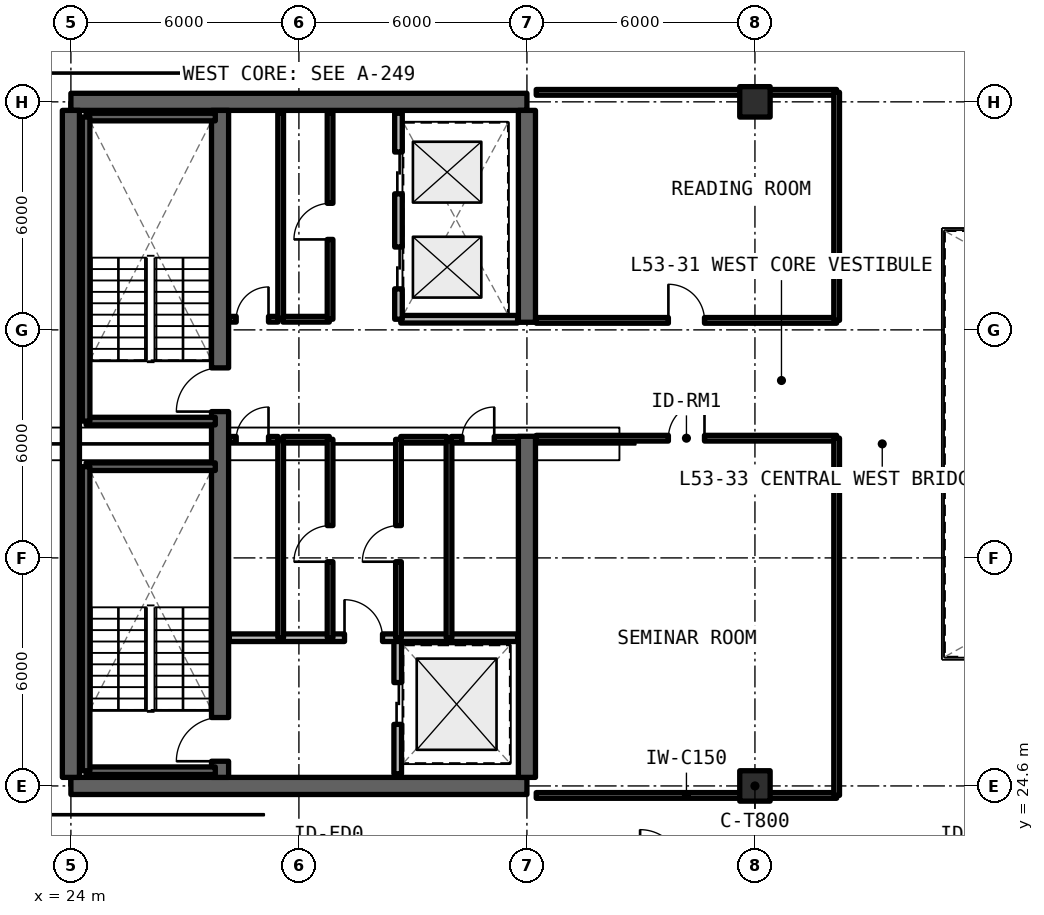
"""IFC4 building model, lengths in metres.
Left out: names, types, materials, properties, quantities, classifications, styles, units other than length and angle.
Written with IfcOpenShell. Run it as: python <this file> out.ifc"""

import sys

from ifc_helpers import new_model, si_unit, direction, frame, frame_2d, origin, origin_2d, place, context, subcontext, project, spatial, rectangle, extrude, element, fill, save


model = new_model("IFC4")
c1 = context("Model", 3, precision=1e-05, world=origin(), true_north=direction((0.0, 1.0)))
c2 = subcontext(c1, "Body", "Model", "MODEL_VIEW")
j1 = project(units=[si_unit("LENGTHUNIT", "METRE"), si_unit("PLANEANGLEUNIT", "RADIAN")], contexts=[c1])
p1 = place(None, origin())
s1 = spatial("IfcSite", under=j1, at=p1, CompositionType="ELEMENT")
p2 = place(p1, origin())
s2 = spatial("IfcBuilding", under=s1, at=p2, CompositionType="ELEMENT")
p3 = place(p2, frame((0.0, 0.0, 191.73)))
s3 = spatial("IfcBuildingStorey", under=s2, at=p3, CompositionType="ELEMENT", Elevation=191.73)
for number, where, z_axis, x_axis in (
    (1, (24.0, 24.6, 0.0), (0.0, 0.0, 1.0), (1.0, 0.0, 0.0)),
    (2, (36.0, 42.6, 0.0), (0.0, 0.0, 1.0), (-1.0, 0.0, 0.0)),
):
    element("IfcWall", number, at=place(p3, frame(where, z_axis=z_axis, x_axis=x_axis)), inside=s3, PredefinedType="SHEAR", context=c2, shape_type="SweptSolid", body=[
        extrude(rectangle(XDim=12.0, YDim=0.45, at=frame_2d((6.0, 0.0))), origin(), (0.0, 0.0, 1.0), 3.3),
    ])
p4 = place(p3, frame((24.0, 24.825, 0.0), z_axis=(0.0, 0.0, 1.0), x_axis=(0.0, 1.0, 0.0)))
e3 = element("IfcWall", 3, at=p4, inside=s3, PredefinedType="SHEAR", context=c2, shape_type="SweptSolid", body=[
    extrude(rectangle(XDim=17.55, YDim=0.45, at=frame_2d((8.775, 0.0))), origin(), (0.0, 0.0, 1.0), 3.3),
])
p5 = place(p3, frame((36.0, 24.825, 0.0), z_axis=(0.0, 0.0, 1.0), x_axis=(0.0, 1.0, 0.0)))
e4 = element("IfcWall", 4, at=p5, inside=s3, PredefinedType="SHEAR", context=c2, shape_type="SweptSolid", body=[
    extrude(rectangle(XDim=8.975, YDim=0.45, at=frame_2d((4.488, 0.0))), origin(), (0.0, 0.0, 1.0), 3.3),
])
p6 = place(p3, frame((36.0, 36.8, 0.0), z_axis=(0.0, 0.0, 1.0), x_axis=(0.0, 1.0, 0.0)))
e5 = element("IfcWall", 5, at=p6, inside=s3, PredefinedType="SHEAR", context=c2, shape_type="SweptSolid", body=[
    extrude(rectangle(XDim=5.575, YDim=0.45, at=frame_2d((2.788, 0.0))), origin(), (0.0, 0.0, 1.0), 3.3),
])
p7 = place(p3, frame((27.925, 24.825, 0.0), z_axis=(0.0, 0.0, 1.0), x_axis=(0.0, 1.0, 0.0)))
e6 = element("IfcWall", 6, at=p7, inside=s3, PredefinedType="SHEAR", context=c2, shape_type="SweptSolid", body=[
    extrude(rectangle(XDim=17.55, YDim=0.45, at=frame_2d((8.775, 0.0))), origin(), (0.0, 0.0, 1.0), 3.3),
])
p8 = place(p7, frame((0.425, 0.0, 0.0)))
e7 = element("IfcOpeningElement", 7, at=p8, cuts=e6, PredefinedType="OPENING", context=c2, shape_type="SweptSolid", body=[
    extrude(rectangle(XDim=1.15, YDim=2.15, at=frame_2d((0.575, 1.075))), frame((0.0, 0.235, 0.0), z_axis=(0.0, -1.0, 0.0), x_axis=(1.0, 0.0, 0.0)), (0.0, 0.0, 1.0), 0.47),
])
p9 = place(p7, frame((9.625, 0.0, 0.0)))
e8 = element("IfcOpeningElement", 8, at=p9, cuts=e6, PredefinedType="OPENING", context=c2, shape_type="SweptSolid", body=[
    extrude(rectangle(XDim=1.15, YDim=2.15, at=frame_2d((0.575, 1.075))), frame((0.0, 0.235, 0.0), z_axis=(0.0, -1.0, 0.0), x_axis=(1.0, 0.0, 0.0)), (0.0, 0.0, 1.0), 0.47),
])
for number, where, z_axis, x_axis in (
    (9, (42.0, 24.6, 0.0), (0.0, 0.0, 1.0), (1.0, 0.0, 0.0)),
    (10, (42.0, 42.6, 0.0), (0.0, 0.0, 1.0), (1.0, 0.0, 0.0)),
):
    element("IfcColumn", number, at=place(p3, frame(where, z_axis=z_axis, x_axis=x_axis)), inside=s3, PredefinedType="COLUMN", context=c2, shape_type="SweptSolid", body=[
        extrude(rectangle(XDim=0.8, YDim=0.8, at=origin_2d()), origin(), (0.0, 0.0, 1.0), 3.3),
    ])
p10 = place(p3, frame((32.6, 24.92, 0.0), z_axis=(0.0, 0.0, 1.0), x_axis=(0.0, 1.0, 0.0)))
e11 = element("IfcWall", 11, at=p10, inside=s3, PredefinedType="SOLIDWALL", context=c2, shape_type="SweptSolid", body=[
    extrude(rectangle(XDim=3.58, YDim=0.2, at=frame_2d((1.79, 0.0))), origin(), (0.0, 0.0, 1.0), 2.35),
])
p11 = place(p10, frame((1.3, 0.0, 0.0)))
e12 = element("IfcOpeningElement", 12, at=p11, cuts=e11, PredefinedType="OPENING", context=c2, shape_type="SweptSolid", body=[
    extrude(rectangle(XDim=1.1, YDim=2.2, at=frame_2d((0.55, 1.1))), frame((0.0, 0.11, 0.0), z_axis=(0.0, -1.0, 0.0), x_axis=(1.0, 0.0, 0.0)), (0.0, 0.0, 1.0), 0.22),
])
p12 = place(p3, frame((28.17, 28.5, 0.0), z_axis=(0.0, 0.0, 1.0), x_axis=(1.0, 0.0, 0.0)))
e13 = element("IfcWall", 13, at=p12, inside=s3, PredefinedType="SOLIDWALL", context=c2, shape_type="SweptSolid", body=[
    extrude(rectangle(XDim=7.585, YDim=0.2, at=frame_2d((3.792, 0.0))), origin(), (0.0, 0.0, 1.0), 2.35),
])
p13 = place(p12, frame((3.03, 0.0, 0.0)))
e14 = element("IfcOpeningElement", 14, at=p13, cuts=e13, PredefinedType="OPENING", context=c2, shape_type="SweptSolid", body=[
    extrude(rectangle(XDim=1.0, YDim=2.15, at=frame_2d((0.5, 1.075))), frame((0.0, 0.11, 0.0), z_axis=(0.0, -1.0, 0.0), x_axis=(1.0, 0.0, 0.0)), (0.0, 0.0, 1.0), 0.22),
])
p14 = place(p3, frame((29.52, 28.5, 0.0), z_axis=(0.0, 0.0, 1.0), x_axis=(0.0, 1.0, 0.0)))
e15 = element("IfcWall", 15, at=p14, inside=s3, PredefinedType="SOLIDWALL", context=c2, shape_type="SweptSolid", body=[
    extrude(rectangle(XDim=5.22, YDim=0.15, at=frame_2d((2.61, 0.0))), origin(), (0.0, 0.0, 1.0), 2.35),
])
p15 = place(p3, frame((28.17, 33.72, 0.0), z_axis=(0.0, 0.0, 1.0), x_axis=(1.0, 0.0, 0.0)))
e16 = element("IfcWall", 16, at=p15, inside=s3, PredefinedType="SOLIDWALL", context=c2, shape_type="SweptSolid", body=[
    extrude(rectangle(XDim=1.28, YDim=0.15, at=frame_2d((0.64, 0.0))), origin(), (0.0, 0.0, 1.0), 2.35),
])
p16 = place(p15, frame((0.18, 0.0, 0.0)))
e17 = element("IfcOpeningElement", 17, at=p16, cuts=e16, PredefinedType="OPENING", context=c2, shape_type="SweptSolid", body=[
    extrude(rectangle(XDim=0.85, YDim=2.1, at=frame_2d((0.425, 1.05))), frame((0.0, 0.085, 0.0), z_axis=(0.0, -1.0, 0.0), x_axis=(1.0, 0.0, 0.0)), (0.0, 0.0, 1.0), 0.17),
])
p17 = place(p3, frame((29.58, 33.72, 0.0), z_axis=(0.0, 0.0, 1.0), x_axis=(1.0, 0.0, 0.0)))
e18 = element("IfcWall", 18, at=p17, inside=s3, PredefinedType="SOLIDWALL", context=c2, shape_type="SweptSolid", body=[
    extrude(rectangle(XDim=1.22, YDim=0.15, at=frame_2d((0.61, 0.0))), origin(), (0.0, 0.0, 1.0), 2.35),
])
p18 = place(p3, frame((30.82, 28.5, 0.0), z_axis=(0.0, 0.0, 1.0), x_axis=(0.0, 1.0, 0.0)))
e19 = element("IfcWall", 19, at=p18, inside=s3, PredefinedType="SOLIDWALL", context=c2, shape_type="SweptSolid", body=[
    extrude(rectangle(XDim=5.22, YDim=0.15, at=frame_2d((2.61, 0.0))), origin(), (0.0, 0.0, 1.0), 2.35),
])
p19 = place(p18, frame((2.0, 0.0, 0.0)))
e20 = element("IfcOpeningElement", 20, at=p19, cuts=e19, PredefinedType="OPENING", context=c2, shape_type="SweptSolid", body=[
    extrude(rectangle(XDim=0.95, YDim=2.15, at=frame_2d((0.475, 1.075))), frame((0.0, 0.085, 0.0), z_axis=(0.0, -1.0, 0.0), x_axis=(1.0, 0.0, 0.0)), (0.0, 0.0, 1.0), 0.17),
])
p20 = place(p3, frame((33.95, 28.5, 0.0), z_axis=(0.0, 0.0, 1.0), x_axis=(0.0, 1.0, 0.0)))
e21 = element("IfcWall", 21, at=p20, inside=s3, PredefinedType="SOLIDWALL", context=c2, shape_type="SweptSolid", body=[
    extrude(rectangle(XDim=5.22, YDim=0.15, at=frame_2d((2.61, 0.0))), origin(), (0.0, 0.0, 1.0), 2.35),
])
p21 = place(p3, frame((32.68, 33.72, 0.0), z_axis=(0.0, 0.0, 1.0), x_axis=(1.0, 0.0, 0.0)))
e22 = element("IfcWall", 22, at=p21, inside=s3, PredefinedType="SOLIDWALL", context=c2, shape_type="SweptSolid", body=[
    extrude(rectangle(XDim=1.21, YDim=0.15, at=frame_2d((0.605, 0.0))), origin(), (0.0, 0.0, 1.0), 2.35),
])
p22 = place(p3, frame((34.01, 33.72, 0.0), z_axis=(0.0, 0.0, 1.0), x_axis=(1.0, 0.0, 0.0)))
e23 = element("IfcWall", 23, at=p22, inside=s3, PredefinedType="SOLIDWALL", context=c2, shape_type="SweptSolid", body=[
    extrude(rectangle(XDim=1.745, YDim=0.15, at=frame_2d((0.873, 0.0))), origin(), (0.0, 0.0, 1.0), 2.35),
])
p23 = place(p22, frame((0.28, 0.0, 0.0)))
e24 = element("IfcOpeningElement", 24, at=p23, cuts=e23, PredefinedType="OPENING", context=c2, shape_type="SweptSolid", body=[
    extrude(rectangle(XDim=0.85, YDim=2.1, at=frame_2d((0.425, 1.05))), frame((0.0, 0.085, 0.0), z_axis=(0.0, -1.0, 0.0), x_axis=(1.0, 0.0, 0.0)), (0.0, 0.0, 1.0), 0.17),
])
p24 = place(p3, frame((32.62, 28.5, 0.0), z_axis=(0.0, 0.0, 1.0), x_axis=(0.0, 1.0, 0.0)))
e25 = element("IfcWall", 25, at=p24, inside=s3, PredefinedType="SOLIDWALL", context=c2, shape_type="SweptSolid", body=[
    extrude(rectangle(XDim=5.22, YDim=0.15, at=frame_2d((2.61, 0.0))), origin(), (0.0, 0.0, 1.0), 2.35),
])
p25 = place(p24, frame((2.0, 0.0, 0.0)))
e26 = element("IfcOpeningElement", 26, at=p25, cuts=e25, PredefinedType="OPENING", context=c2, shape_type="SweptSolid", body=[
    extrude(rectangle(XDim=0.95, YDim=2.15, at=frame_2d((0.475, 1.075))), frame((0.0, 0.085, 0.0), z_axis=(0.0, -1.0, 0.0), x_axis=(1.0, 0.0, 0.0)), (0.0, 0.0, 1.0), 0.17),
])
p26 = place(p3, frame((29.52, 36.88, 0.0), z_axis=(0.0, 0.0, 1.0), x_axis=(0.0, 1.0, 0.0)))
e27 = element("IfcWall", 27, at=p26, inside=s3, PredefinedType="SOLIDWALL", context=c2, shape_type="SweptSolid", body=[
    extrude(rectangle(XDim=5.42, YDim=0.15, at=frame_2d((2.71, 0.0))), origin(), (0.0, 0.0, 1.0), 2.35),
])
p27 = place(p3, frame((28.17, 36.88, 0.0), z_axis=(0.0, 0.0, 1.0), x_axis=(1.0, 0.0, 0.0)))
e28 = element("IfcWall", 28, at=p27, inside=s3, PredefinedType="SOLIDWALL", context=c2, shape_type="SweptSolid", body=[
    extrude(rectangle(XDim=1.28, YDim=0.15, at=frame_2d((0.64, 0.0))), origin(), (0.0, 0.0, 1.0), 2.35),
])
p28 = place(p27, frame((0.18, 0.0, 0.0)))
e29 = element("IfcOpeningElement", 29, at=p28, cuts=e28, PredefinedType="OPENING", context=c2, shape_type="SweptSolid", body=[
    extrude(rectangle(XDim=0.85, YDim=2.1, at=frame_2d((0.425, 1.05))), frame((0.0, 0.085, 0.0), z_axis=(0.0, -1.0, 0.0), x_axis=(1.0, 0.0, 0.0)), (0.0, 0.0, 1.0), 0.17),
])
p29 = place(p3, frame((29.58, 36.88, 0.0), z_axis=(0.0, 0.0, 1.0), x_axis=(1.0, 0.0, 0.0)))
e30 = element("IfcWall", 30, at=p29, inside=s3, PredefinedType="SOLIDWALL", context=c2, shape_type="SweptSolid", body=[
    extrude(rectangle(XDim=1.22, YDim=0.15, at=frame_2d((0.61, 0.0))), origin(), (0.0, 0.0, 1.0), 2.35),
])
p30 = place(p3, frame((30.82, 36.88, 0.0), z_axis=(0.0, 0.0, 1.0), x_axis=(0.0, 1.0, 0.0)))
e31 = element("IfcWall", 31, at=p30, inside=s3, PredefinedType="SOLIDWALL", context=c2, shape_type="SweptSolid", body=[
    extrude(rectangle(XDim=5.42, YDim=0.15, at=frame_2d((2.71, 0.0))), origin(), (0.0, 0.0, 1.0), 2.35),
])
p31 = place(p30, frame((2.1, 0.0, 0.0)))
e32 = element("IfcOpeningElement", 32, at=p31, cuts=e31, PredefinedType="OPENING", context=c2, shape_type="SweptSolid", body=[
    extrude(rectangle(XDim=0.95, YDim=2.15, at=frame_2d((0.475, 1.075))), frame((0.0, 0.085, 0.0), z_axis=(0.0, -1.0, 0.0), x_axis=(1.0, 0.0, 0.0)), (0.0, 0.0, 1.0), 0.17),
])
p32 = place(p3, frame((32.68, 36.88, 0.0), z_axis=(0.0, 0.0, 1.0), x_axis=(1.0, 0.0, 0.0)))
e33 = element("IfcWall", 33, at=p32, inside=s3, PredefinedType="SOLIDWALL", context=c2, shape_type="SweptSolid", body=[
    extrude(rectangle(XDim=3.075, YDim=0.2, at=frame_2d((1.538, 0.0))), origin(), (0.0, 0.0, 1.0), 2.35),
])
p33 = place(p3, frame((32.62, 36.88, 0.0), z_axis=(0.0, 0.0, 1.0), x_axis=(0.0, 1.0, 0.0)))
e34 = element("IfcWall", 34, at=p33, inside=s3, PredefinedType="SOLIDWALL", context=c2, shape_type="SweptSolid", body=[
    extrude(rectangle(XDim=5.42, YDim=0.2, at=frame_2d((2.71, 0.0))), origin(), (0.0, 0.0, 1.0), 2.35),
])
p34 = place(p33, frame((0.8, 0.0, 0.0)))
e35 = element("IfcOpeningElement", 35, at=p34, cuts=e34, PredefinedType="OPENING", context=c2, shape_type="SweptSolid", body=[
    extrude(rectangle(XDim=1.1, YDim=2.2, at=frame_2d((0.55, 1.1))), frame((0.0, 0.11, 0.0), z_axis=(0.0, -1.0, 0.0), x_axis=(1.0, 0.0, 0.0)), (0.0, 0.0, 1.0), 0.22),
])
p35 = place(p33, frame((3.3, 0.0, 0.0)))
e36 = element("IfcOpeningElement", 36, at=p35, cuts=e34, PredefinedType="OPENING", context=c2, shape_type="SweptSolid", body=[
    extrude(rectangle(XDim=1.1, YDim=2.2, at=frame_2d((0.55, 1.1))), frame((0.0, 0.11, 0.0), z_axis=(0.0, -1.0, 0.0), x_axis=(1.0, 0.0, 0.0)), (0.0, 0.0, 1.0), 0.22),
])
p36 = place(p3, frame((36.245, 24.35, 0.0), z_axis=(0.0, 0.0, 1.0), x_axis=(1.0, 0.0, 0.0)))
e37 = element("IfcWall", 37, at=p36, inside=s3, PredefinedType="SOLIDWALL", context=c2, shape_type="SweptSolid", body=[
    extrude(rectangle(XDim=7.905, YDim=0.15, at=frame_2d((3.952, 0.0))), origin(), (0.0, 0.0, 1.0), 2.35),
])
p37 = place(p3, frame((36.245, 33.75, 0.0), z_axis=(0.0, 0.0, 1.0), x_axis=(1.0, 0.0, 0.0)))
e38 = element("IfcWall", 38, at=p37, inside=s3, PredefinedType="SOLIDWALL", context=c2, shape_type="SweptSolid", body=[
    extrude(rectangle(XDim=7.905, YDim=0.15, at=frame_2d((3.952, 0.0))), origin(), (0.0, 0.0, 1.0), 2.35),
])
p38 = place(p37, frame((3.478, 0.0, 0.0)))
e39 = element("IfcOpeningElement", 39, at=p38, cuts=e38, PredefinedType="OPENING", context=c2, shape_type="SweptSolid", body=[
    extrude(rectangle(XDim=0.95, YDim=2.15, at=frame_2d((0.475, 1.075))), frame((0.0, 0.085, 0.0), z_axis=(0.0, -1.0, 0.0), x_axis=(1.0, 0.0, 0.0)), (0.0, 0.0, 1.0), 0.17),
])
p39 = place(p3, frame((44.15, 24.35, 0.0), z_axis=(0.0, 0.0, 1.0), x_axis=(0.0, 1.0, 0.0)))
e40 = element("IfcWall", 40, at=p39, inside=s3, PredefinedType="SOLIDWALL", context=c2, shape_type="SweptSolid", body=[
    extrude(rectangle(XDim=9.4, YDim=0.15, at=frame_2d((4.7, 0.0))), origin(), (0.0, 0.0, 1.0), 2.35),
])
p40 = place(p3, frame((36.245, 36.85, 0.0), z_axis=(0.0, 0.0, 1.0), x_axis=(1.0, 0.0, 0.0)))
e41 = element("IfcWall", 41, at=p40, inside=s3, PredefinedType="SOLIDWALL", context=c2, shape_type="SweptSolid", body=[
    extrude(rectangle(XDim=7.905, YDim=0.15, at=frame_2d((3.952, 0.0))), origin(), (0.0, 0.0, 1.0), 2.35),
])
p41 = place(p40, frame((3.478, 0.0, 0.0)))
e42 = element("IfcOpeningElement", 42, at=p41, cuts=e41, PredefinedType="OPENING", context=c2, shape_type="SweptSolid", body=[
    extrude(rectangle(XDim=0.95, YDim=2.15, at=frame_2d((0.475, 1.075))), frame((0.0, 0.085, 0.0), z_axis=(0.0, -1.0, 0.0), x_axis=(1.0, 0.0, 0.0)), (0.0, 0.0, 1.0), 0.17),
])
p42 = place(p3, frame((36.245, 42.85, 0.0), z_axis=(0.0, 0.0, 1.0), x_axis=(1.0, 0.0, 0.0)))
e43 = element("IfcWall", 43, at=p42, inside=s3, PredefinedType="SOLIDWALL", context=c2, shape_type="SweptSolid", body=[
    extrude(rectangle(XDim=7.905, YDim=0.15, at=frame_2d((3.952, 0.0))), origin(), (0.0, 0.0, 1.0), 2.35),
])
p43 = place(p3, frame((44.15, 36.85, 0.0), z_axis=(0.0, 0.0, 1.0), x_axis=(0.0, 1.0, 0.0)))
e44 = element("IfcWall", 44, at=p43, inside=s3, PredefinedType="SOLIDWALL", context=c2, shape_type="SweptSolid", body=[
    extrude(rectangle(XDim=6.0, YDim=0.15, at=frame_2d((3.0, 0.0))), origin(), (0.0, 0.0, 1.0), 2.35),
])
for number, where, z_axis, x_axis in (
    (45, (24.4, 25.0, 0.0), (0.0, 0.0, 1.0), (1.0, 0.0, 0.0)),
    (46, (27.8, 33.0, 0.0), (0.0, 0.0, 1.0), (-1.0, 0.0, 0.0)),
):
    element("IfcWall", number, at=place(p3, frame(where, z_axis=z_axis, x_axis=x_axis)), inside=s3, PredefinedType="SOLIDWALL", context=c2, shape_type="SweptSolid", body=[
        extrude(rectangle(XDim=3.4, YDim=0.2, at=frame_2d((1.7, 0.0))), origin(), (0.0, 0.0, 1.0), 3.3),
    ])
p44 = place(p3, frame((24.4, 33.0, 0.0), z_axis=(0.0, 0.0, 1.0), x_axis=(0.0, -1.0, 0.0)))
e47 = element("IfcWall", 47, at=p44, inside=s3, PredefinedType="SOLIDWALL", context=c2, shape_type="SweptSolid", body=[
    extrude(rectangle(XDim=8.0, YDim=0.2, at=frame_2d((4.0, 0.0))), origin(), (0.0, 0.0, 1.0), 3.3),
])
for number, where, z_axis, x_axis in (
    (48, (24.4, 34.2, 0.0), (0.0, 0.0, 1.0), (1.0, 0.0, 0.0)),
    (49, (27.8, 42.2, 0.0), (0.0, 0.0, 1.0), (-1.0, 0.0, 0.0)),
):
    element("IfcWall", number, at=place(p3, frame(where, z_axis=z_axis, x_axis=x_axis)), inside=s3, PredefinedType="SOLIDWALL", context=c2, shape_type="SweptSolid", body=[
        extrude(rectangle(XDim=3.4, YDim=0.2, at=frame_2d((1.7, 0.0))), origin(), (0.0, 0.0, 1.0), 3.3),
    ])
p45 = place(p3, frame((24.4, 42.2, 0.0), z_axis=(0.0, 0.0, 1.0), x_axis=(0.0, -1.0, 0.0)))
e50 = element("IfcWall", 50, at=p45, inside=s3, PredefinedType="SOLIDWALL", context=c2, shape_type="SweptSolid", body=[
    extrude(rectangle(XDim=8.0, YDim=0.2, at=frame_2d((4.0, 0.0))), origin(), (0.0, 0.0, 1.0), 3.3),
])
p46 = place(p11, origin())
e51 = element("IfcDoor", 51, at=p46, inside=s3, OperationType="SLIDING_TO_LEFT", PredefinedType="DOOR", context=c2, shape_type="SweptSolid", body=[
    extrude(rectangle(XDim=1.1, YDim=2.2, at=frame_2d((0.55, 1.1))), frame((0.0, 0.025, 0.0), z_axis=(0.0, -1.0, 0.0), x_axis=(1.0, 0.0, 0.0)), (0.0, 0.0, 1.0), 0.05),
])
fill(e12, e51)
p47 = place(p13, origin())
e52 = element("IfcDoor", 52, at=p47, inside=s3, OperationType="SINGLE_SWING_LEFT", PredefinedType="DOOR", context=c2, shape_type="SweptSolid", body=[
    extrude(rectangle(XDim=1.0, YDim=2.15, at=frame_2d((0.5, 1.075))), frame((0.0, 0.025, 0.0), z_axis=(0.0, -1.0, 0.0), x_axis=(1.0, 0.0, 0.0)), (0.0, 0.0, 1.0), 0.05),
])
fill(e14, e52)
p48 = place(p16, origin())
e53 = element("IfcDoor", 53, at=p48, inside=s3, OperationType="SINGLE_SWING_RIGHT", PredefinedType="DOOR", context=c2, shape_type="SweptSolid", body=[
    extrude(rectangle(XDim=0.85, YDim=2.1, at=frame_2d((0.425, 1.05))), frame((0.0, 0.025, 0.0), z_axis=(0.0, -1.0, 0.0), x_axis=(1.0, 0.0, 0.0)), (0.0, 0.0, 1.0), 0.05),
])
fill(e17, e53)
p49 = place(p19, origin())
e54 = element("IfcDoor", 54, at=p49, inside=s3, OperationType="SINGLE_SWING_LEFT", PredefinedType="DOOR", context=c2, shape_type="SweptSolid", body=[
    extrude(rectangle(XDim=0.95, YDim=2.15, at=frame_2d((0.475, 1.075))), frame((0.0, 0.025, 0.0), z_axis=(0.0, -1.0, 0.0), x_axis=(1.0, 0.0, 0.0)), (0.0, 0.0, 1.0), 0.05),
])
fill(e20, e54)
p50 = place(p23, origin())
e55 = element("IfcDoor", 55, at=p50, inside=s3, OperationType="SINGLE_SWING_RIGHT", PredefinedType="DOOR", context=c2, shape_type="SweptSolid", body=[
    extrude(rectangle(XDim=0.85, YDim=2.1, at=frame_2d((0.425, 1.05))), frame((0.0, 0.025, 0.0), z_axis=(0.0, -1.0, 0.0), x_axis=(1.0, 0.0, 0.0)), (0.0, 0.0, 1.0), 0.05),
])
fill(e24, e55)
p51 = place(p25, origin())
e56 = element("IfcDoor", 56, at=p51, inside=s3, OperationType="SINGLE_SWING_LEFT", PredefinedType="DOOR", context=c2, shape_type="SweptSolid", body=[
    extrude(rectangle(XDim=0.95, YDim=2.15, at=frame_2d((0.475, 1.075))), frame((0.0, 0.025, 0.0), z_axis=(0.0, -1.0, 0.0), x_axis=(1.0, 0.0, 0.0)), (0.0, 0.0, 1.0), 0.05),
])
fill(e26, e56)
p52 = place(p28, origin())
e57 = element("IfcDoor", 57, at=p52, inside=s3, OperationType="SINGLE_SWING_RIGHT", PredefinedType="DOOR", context=c2, shape_type="SweptSolid", body=[
    extrude(rectangle(XDim=0.85, YDim=2.1, at=frame_2d((0.425, 1.05))), frame((0.0, 0.025, 0.0), z_axis=(0.0, -1.0, 0.0), x_axis=(1.0, 0.0, 0.0)), (0.0, 0.0, 1.0), 0.05),
])
fill(e29, e57)
p53 = place(p31, origin())
e58 = element("IfcDoor", 58, at=p53, inside=s3, OperationType="SINGLE_SWING_LEFT", PredefinedType="DOOR", context=c2, shape_type="SweptSolid", body=[
    extrude(rectangle(XDim=0.95, YDim=2.15, at=frame_2d((0.475, 1.075))), frame((0.0, 0.025, 0.0), z_axis=(0.0, -1.0, 0.0), x_axis=(1.0, 0.0, 0.0)), (0.0, 0.0, 1.0), 0.05),
])
fill(e32, e58)
p54 = place(p34, origin())
e59 = element("IfcDoor", 59, at=p54, inside=s3, OperationType="SLIDING_TO_LEFT", PredefinedType="DOOR", context=c2, shape_type="SweptSolid", body=[
    extrude(rectangle(XDim=1.1, YDim=2.2, at=frame_2d((0.55, 1.1))), frame((0.0, 0.025, 0.0), z_axis=(0.0, -1.0, 0.0), x_axis=(1.0, 0.0, 0.0)), (0.0, 0.0, 1.0), 0.05),
])
fill(e35, e59)
p55 = place(p35, origin())
e60 = element("IfcDoor", 60, at=p55, inside=s3, OperationType="SLIDING_TO_RIGHT", PredefinedType="DOOR", context=c2, shape_type="SweptSolid", body=[
    extrude(rectangle(XDim=1.1, YDim=2.2, at=frame_2d((0.55, 1.1))), frame((0.0, 0.025, 0.0), z_axis=(0.0, -1.0, 0.0), x_axis=(1.0, 0.0, 0.0)), (0.0, 0.0, 1.0), 0.05),
])
fill(e36, e60)
p56 = place(p38, origin())
e61 = element("IfcDoor", 61, at=p56, inside=s3, OperationType="SINGLE_SWING_RIGHT", PredefinedType="DOOR", context=c2, shape_type="SweptSolid", body=[
    extrude(rectangle(XDim=0.95, YDim=2.15, at=frame_2d((0.475, 1.075))), frame((0.0, 0.025, 0.0), z_axis=(0.0, -1.0, 0.0), x_axis=(1.0, 0.0, 0.0)), (0.0, 0.0, 1.0), 0.05),
])
fill(e39, e61)
p57 = place(p41, origin())
e62 = element("IfcDoor", 62, at=p57, inside=s3, OperationType="SINGLE_SWING_LEFT", PredefinedType="DOOR", context=c2, shape_type="SweptSolid", body=[
    extrude(rectangle(XDim=0.95, YDim=2.15, at=frame_2d((0.475, 1.075))), frame((0.0, 0.025, 0.0), z_axis=(0.0, -1.0, 0.0), x_axis=(1.0, 0.0, 0.0)), (0.0, 0.0, 1.0), 0.05),
])
fill(e42, e62)
p58 = place(p8, origin())
e63 = element("IfcDoor", 63, at=p58, inside=s3, OperationType="SINGLE_SWING_RIGHT", PredefinedType="DOOR", context=c2, shape_type="SweptSolid", body=[
    extrude(rectangle(XDim=1.15, YDim=2.15, at=frame_2d((0.575, 1.075))), frame((0.0, 0.025, 0.0), z_axis=(0.0, -1.0, 0.0), x_axis=(1.0, 0.0, 0.0)), (0.0, 0.0, 1.0), 0.05),
])
fill(e7, e63)
p59 = place(p9, origin())
e64 = element("IfcDoor", 64, at=p59, inside=s3, OperationType="SINGLE_SWING_LEFT", PredefinedType="DOOR", context=c2, shape_type="SweptSolid", body=[
    extrude(rectangle(XDim=1.15, YDim=2.15, at=frame_2d((0.575, 1.075))), frame((0.0, 0.025, 0.0), z_axis=(0.0, -1.0, 0.0), x_axis=(1.0, 0.0, 0.0)), (0.0, 0.0, 1.0), 0.05),
])
fill(e8, e64)
save(model, sys.argv[1])
